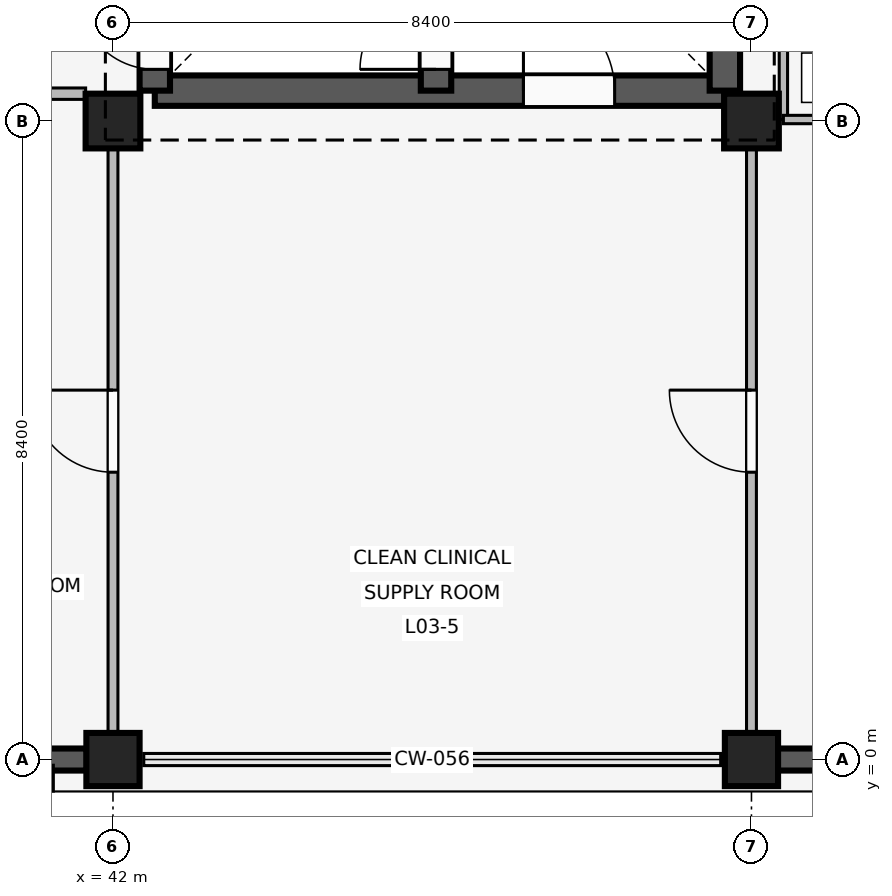
"""IFC4 building model, lengths in metres.
Left out: names, types, materials, properties, quantities, classifications, styles, units other than length and angle.
Written with IfcOpenShell. Run it as: python <this file> out.ifc"""

import sys

from ifc_helpers import new_model, si_unit, direction, frame, frame_2d, origin, origin_2d, place, context, subcontext, project, spatial, rectangle, extrude, element, fill, save


model = new_model("IFC4")
c1 = context("Model", 3, precision=1e-05, world=origin(), true_north=direction((0.0, 1.0)))
c2 = subcontext(c1, "Body", "Model", "MODEL_VIEW")
j1 = project(units=[si_unit("LENGTHUNIT", "METRE"), si_unit("PLANEANGLEUNIT", "RADIAN")], contexts=[c1])
p1 = place(None, origin())
s1 = spatial("IfcSite", under=j1, at=p1, CompositionType="ELEMENT")
p2 = place(p1, origin())
s2 = spatial("IfcBuilding", under=s1, at=p2, CompositionType="ELEMENT")
p3 = place(p2, frame((0.0, 0.0, 12.9)))
s3 = spatial("IfcBuildingStorey", under=s2, at=p3, CompositionType="ELEMENT", Elevation=12.9)
p4 = place(p3, frame((42.0, 0.0, 0.0), z_axis=(0.0, 0.0, 1.0), x_axis=(1.0, 0.0, 0.0)))
e1 = element("IfcColumn", 1, at=p4, inside=s3, PredefinedType="COLUMN", context=c2, shape_type="SweptSolid", body=[
    extrude(rectangle(XDim=0.7, YDim=0.7, at=origin_2d()), origin(), (0.0, 0.0, 1.0), 3.3),
])
p5 = place(p3, frame((42.0, 8.4, 0.0), z_axis=(0.0, 0.0, 1.0), x_axis=(1.0, 0.0, 0.0)))
e2 = element("IfcColumn", 2, at=p5, inside=s3, PredefinedType="COLUMN", context=c2, shape_type="SweptSolid", body=[
    extrude(rectangle(XDim=0.72, YDim=0.72, at=origin_2d()), origin(), (0.0, 0.0, 1.0), 3.3),
])
p6 = place(p3, frame((50.4, 0.0, 0.0), z_axis=(0.0, 0.0, 1.0), x_axis=(1.0, 0.0, 0.0)))
e3 = element("IfcColumn", 3, at=p6, inside=s3, PredefinedType="COLUMN", context=c2, shape_type="SweptSolid", body=[
    extrude(rectangle(XDim=0.7, YDim=0.7, at=origin_2d()), origin(), (0.0, 0.0, 1.0), 3.3),
])
p7 = place(p3, frame((50.4, 8.4, 0.0), z_axis=(0.0, 0.0, 1.0), x_axis=(1.0, 0.0, 0.0)))
e4 = element("IfcColumn", 4, at=p7, inside=s3, PredefinedType="COLUMN", context=c2, shape_type="SweptSolid", body=[
    extrude(rectangle(XDim=0.72, YDim=0.72, at=origin_2d()), origin(), (0.0, 0.0, 1.0), 3.3),
])
p8 = place(p3, frame((41.655, 0.0, 0.0), z_axis=(0.0, 0.0, 1.0), x_axis=(-1.0, 0.0, 0.0)))
e5 = element("IfcWall", 5, at=p8, inside=s3, PredefinedType="SOLIDWALL", context=c2, shape_type="SweptSolid", body=[
    extrude(rectangle(XDim=7.71, YDim=0.29, at=frame_2d((3.855, 0.0))), origin(), (0.0, 0.0, 1.0), 2.44),
])
p9 = place(p8, frame((5.127, 0.0, 0.85)))
e6 = element("IfcOpeningElement", 6, at=p9, cuts=e5, PredefinedType="OPENING", context=c2, shape_type="SweptSolid", body=[
    extrude(rectangle(XDim=1.62, YDim=0.95, at=frame_2d((0.81, 0.475))), frame((0.0, 0.155, 0.0), z_axis=(0.0, -1.0, 0.0), x_axis=(1.0, 0.0, 0.0)), (0.0, 0.0, 1.0), 0.31),
])
p10 = place(p3, frame((41.115, -0.075, 0.0), z_axis=(0.0, 0.0, 1.0), x_axis=(0.0, -1.0, 0.0)))
e7 = element("IfcWall", 7, at=p10, inside=s3, PredefinedType="ELEMENTEDWALL", context=c2, shape_type="SweptSolid", body=[
    extrude(rectangle(XDim=0.34, YDim=0.2, at=frame_2d((0.17, 0.0))), origin(), (0.0, 0.0, 1.0), 2.42),
])
p11 = place(p3, frame((58.455, 0.0, 0.0), z_axis=(0.0, 0.0, 1.0), x_axis=(-1.0, 0.0, 0.0)))
e8 = element("IfcWall", 8, at=p11, inside=s3, PredefinedType="SOLIDWALL", context=c2, shape_type="SweptSolid", body=[
    extrude(rectangle(XDim=7.71, YDim=0.29, at=frame_2d((3.855, 0.0))), origin(), (0.0, 0.0, 1.0), 2.44),
])
p12 = place(p11, frame((0.963, 0.0, 0.85)))
e9 = element("IfcOpeningElement", 9, at=p12, cuts=e8, PredefinedType="OPENING", context=c2, shape_type="SweptSolid", body=[
    extrude(rectangle(XDim=1.62, YDim=0.95, at=frame_2d((0.81, 0.475))), frame((0.0, 0.155, 0.0), z_axis=(0.0, -1.0, 0.0), x_axis=(1.0, 0.0, 0.0)), (0.0, 0.0, 1.0), 0.31),
])
p13 = place(p11, frame((5.127, 0.0, 0.85)))
e10 = element("IfcOpeningElement", 10, at=p13, cuts=e8, PredefinedType="OPENING", context=c2, shape_type="SweptSolid", body=[
    extrude(rectangle(XDim=1.62, YDim=0.95, at=frame_2d((0.81, 0.475))), frame((0.0, 0.155, 0.0), z_axis=(0.0, -1.0, 0.0), x_axis=(1.0, 0.0, 0.0)), (0.0, 0.0, 1.0), 0.31),
])
p14 = place(p3, frame((42.55, 8.8, 0.0), z_axis=(0.0, 0.0, 1.0), x_axis=(1.0, 0.0, 0.0)))
e11 = element("IfcWall", 11, at=p14, inside=s3, PredefinedType="SHEAR", context=c2, shape_type="SweptSolid", body=[
    extrude(rectangle(XDim=7.5, YDim=0.4, at=frame_2d((3.75, 0.0))), origin(), (0.0, 0.0, 1.0), 3.02),
])
p15 = place(p14, frame((4.85, 0.0, 0.0)))
e12 = element("IfcOpeningElement", 12, at=p15, cuts=e11, PredefinedType="OPENING", context=c2, shape_type="SweptSolid", body=[
    extrude(rectangle(XDim=1.2, YDim=2.2, at=frame_2d((0.6, 1.1))), frame((0.0, 0.21, 0.0), z_axis=(0.0, -1.0, 0.0), x_axis=(1.0, 0.0, 0.0)), (0.0, 0.0, 1.0), 0.42),
])
p16 = place(p3, frame((42.55, 8.8, 0.0), z_axis=(0.0, 0.0, 1.0), x_axis=(0.0, 1.0, 0.0)))
e13 = element("IfcWall", 13, at=p16, inside=s3, PredefinedType="SHEAR", context=c2, shape_type="SweptSolid", body=[
    extrude(rectangle(XDim=7.55, YDim=0.4, at=frame_2d((3.775, 0.0))), origin(), (0.0, 0.0, 1.0), 3.02),
])
p17 = place(p16, frame((0.28, 0.0, 0.0)))
e14 = element("IfcOpeningElement", 14, at=p17, cuts=e13, PredefinedType="OPENING", context=c2, shape_type="SweptSolid", body=[
    extrude(rectangle(XDim=1.0, YDim=2.15, at=frame_2d((0.5, 1.075))), frame((0.0, 0.21, 0.0), z_axis=(0.0, -1.0, 0.0), x_axis=(1.0, 0.0, 0.0)), (0.0, 0.0, 1.0), 0.42),
])
p18 = place(p3, frame((50.05, 8.8, 0.0), z_axis=(0.0, 0.0, 1.0), x_axis=(0.0, 1.0, 0.0)))
e15 = element("IfcWall", 15, at=p18, inside=s3, PredefinedType="SHEAR", context=c2, shape_type="SweptSolid", body=[
    extrude(rectangle(XDim=7.55, YDim=0.4, at=frame_2d((3.775, 0.0))), origin(), (0.0, 0.0, 1.0), 3.02),
])
p19 = place(p18, frame((2.4, 0.0, 0.0)))
e16 = element("IfcOpeningElement", 16, at=p19, cuts=e15, PredefinedType="OPENING", context=c2, shape_type="SweptSolid", body=[
    extrude(rectangle(XDim=1.2, YDim=2.2, at=frame_2d((0.6, 1.1))), frame((0.0, 0.21, 0.0), z_axis=(0.0, -1.0, 0.0), x_axis=(1.0, 0.0, 0.0)), (0.0, 0.0, 1.0), 0.42),
])
p20 = place(p3, frame((46.25, 8.8, 0.0), z_axis=(0.0, 0.0, 1.0), x_axis=(0.0, 1.0, 0.0)))
e17 = element("IfcWall", 17, at=p20, inside=s3, PredefinedType="SHEAR", context=c2, shape_type="SweptSolid", body=[
    extrude(rectangle(XDim=7.55, YDim=0.4, at=frame_2d((3.775, 0.0))), origin(), (0.0, 0.0, 1.0), 3.02),
])
p21 = place(p20, frame((0.28, 0.0, 0.0)))
e18 = element("IfcOpeningElement", 18, at=p21, cuts=e17, PredefinedType="OPENING", context=c2, shape_type="SweptSolid", body=[
    extrude(rectangle(XDim=1.0, YDim=2.15, at=frame_2d((0.5, 1.075))), frame((0.0, 0.21, 0.0), z_axis=(0.0, -1.0, 0.0), x_axis=(1.0, 0.0, 0.0)), (0.0, 0.0, 1.0), 0.42),
])
p22 = place(p3, frame((39.46, 8.76, 0.0), z_axis=(0.0, 0.0, 1.0), x_axis=(1.0, 0.0, 0.0)))
e19 = element("IfcWall", 19, at=p22, inside=s3, PredefinedType="PARTITIONING", context=c2, shape_type="SweptSolid", body=[
    extrude(rectangle(XDim=2.18, YDim=0.15, at=frame_2d((1.09, 0.0))), origin(), (0.0, 0.0, 1.0), 2.42),
])
p23 = place(p22, frame((0.5, 0.0, 0.0)))
e20 = element("IfcOpeningElement", 20, at=p23, cuts=e19, PredefinedType="OPENING", context=c2, shape_type="SweptSolid", body=[
    extrude(rectangle(XDim=1.08, YDim=2.15, at=frame_2d((0.54, 1.075))), frame((0.0, 0.085, 0.0), z_axis=(0.0, -1.0, 0.0), x_axis=(1.0, 0.0, 0.0)), (0.0, 0.0, 1.0), 0.17),
])
p24 = place(p3, frame((42.0, 0.14, 0.0), z_axis=(0.0, 0.0, 1.0), x_axis=(0.0, 1.0, 0.0)))
e21 = element("IfcWall", 21, at=p24, inside=s3, PredefinedType="PARTITIONING", context=c2, shape_type="SweptSolid", body=[
    extrude(rectangle(XDim=8.21, YDim=0.13, at=frame_2d((4.105, 0.0))), origin(), (0.0, 0.0, 1.0), 2.42),
])
p25 = place(p24, frame((3.64, 0.0, 0.0)))
e22 = element("IfcOpeningElement", 22, at=p25, cuts=e21, PredefinedType="OPENING", context=c2, shape_type="SweptSolid", body=[
    extrude(rectangle(XDim=1.08, YDim=2.15, at=frame_2d((0.54, 1.075))), frame((0.0, 0.075, 0.0), z_axis=(0.0, -1.0, 0.0), x_axis=(1.0, 0.0, 0.0)), (0.0, 0.0, 1.0), 0.15),
])
p26 = place(p3, frame((50.4, 0.14, 0.0), z_axis=(0.0, 0.0, 1.0), x_axis=(0.0, 1.0, 0.0)))
e23 = element("IfcWall", 23, at=p26, inside=s3, PredefinedType="PARTITIONING", context=c2, shape_type="SweptSolid", body=[
    extrude(rectangle(XDim=8.21, YDim=0.13, at=frame_2d((4.105, 0.0))), origin(), (0.0, 0.0, 1.0), 2.42),
])
p27 = place(p26, frame((3.64, 0.0, 0.0)))
e24 = element("IfcOpeningElement", 24, at=p27, cuts=e23, PredefinedType="OPENING", context=c2, shape_type="SweptSolid", body=[
    extrude(rectangle(XDim=1.08, YDim=2.15, at=frame_2d((0.54, 1.075))), frame((0.0, 0.075, 0.0), z_axis=(0.0, -1.0, 0.0), x_axis=(1.0, 0.0, 0.0)), (0.0, 0.0, 1.0), 0.15),
])
p28 = place(p3, frame((50.82, 8.42, 0.0), z_axis=(0.0, 0.0, 1.0), x_axis=(0.0, 1.0, 0.0)))
e25 = element("IfcWall", 25, at=p28, inside=s3, PredefinedType="PARTITIONING", context=c2, shape_type="SweptSolid", body=[
    extrude(rectangle(XDim=2.61, YDim=0.11, at=frame_2d((1.305, 0.0))), origin(), (0.0, 0.0, 1.0), 2.42),
])
p29 = place(p3, frame((50.82, 8.42, 0.0), z_axis=(0.0, 0.0, 1.0), x_axis=(1.0, 0.0, 0.0)))
e26 = element("IfcWall", 26, at=p29, inside=s3, PredefinedType="PARTITIONING", context=c2, shape_type="SweptSolid", body=[
    extrude(rectangle(XDim=1.98, YDim=0.11, at=frame_2d((0.99, 0.0))), origin(), (0.0, 0.0, 1.0), 2.42),
])
p30 = place(p29, frame((0.54, 0.0, 0.0)))
e27 = element("IfcOpeningElement", 27, at=p30, cuts=e26, PredefinedType="OPENING", context=c2, shape_type="SweptSolid", body=[
    extrude(rectangle(XDim=0.9, YDim=2.1, at=frame_2d((0.45, 1.05))), frame((0.0, 0.065, 0.0), z_axis=(0.0, -1.0, 0.0), x_axis=(1.0, 0.0, 0.0)), (0.0, 0.0, 1.0), 0.13),
])
p31 = place(p15, origin())
e28 = element("IfcDoor", 28, at=p31, inside=s3, OperationType="SINGLE_SWING_LEFT", PredefinedType="DOOR", context=c2, shape_type="SweptSolid", body=[
    extrude(rectangle(XDim=1.2, YDim=2.2, at=frame_2d((0.6, 1.1))), frame((0.0, 0.025, 0.0), z_axis=(0.0, -1.0, 0.0), x_axis=(1.0, 0.0, 0.0)), (0.0, 0.0, 1.0), 0.05),
])
fill(e12, e28)
p32 = place(p17, origin())
e29 = element("IfcDoor", 29, at=p32, inside=s3, OperationType="SINGLE_SWING_RIGHT", PredefinedType="DOOR", context=c2, shape_type="SweptSolid", body=[
    extrude(rectangle(XDim=1.0, YDim=2.15, at=frame_2d((0.5, 1.075))), frame((0.0, 0.025, 0.0), z_axis=(0.0, -1.0, 0.0), x_axis=(1.0, 0.0, 0.0)), (0.0, 0.0, 1.0), 0.05),
])
fill(e14, e29)
p33 = place(p21, origin())
e30 = element("IfcDoor", 30, at=p33, inside=s3, OperationType="SINGLE_SWING_LEFT", PredefinedType="DOOR", context=c2, shape_type="SweptSolid", body=[
    extrude(rectangle(XDim=1.0, YDim=2.15, at=frame_2d((0.5, 1.075))), frame((0.0, 0.025, 0.0), z_axis=(0.0, -1.0, 0.0), x_axis=(1.0, 0.0, 0.0)), (0.0, 0.0, 1.0), 0.05),
])
fill(e18, e30)
p34 = place(p25, origin())
e31 = element("IfcDoor", 31, at=p34, inside=s3, OperationType="SINGLE_SWING_RIGHT", PredefinedType="DOOR", context=c2, shape_type="SweptSolid", body=[
    extrude(rectangle(XDim=1.08, YDim=2.15, at=frame_2d((0.54, 1.075))), frame((0.0, 0.025, 0.0), z_axis=(0.0, -1.0, 0.0), x_axis=(1.0, 0.0, 0.0)), (0.0, 0.0, 1.0), 0.05),
])
fill(e22, e31)
p35 = place(p27, origin())
e32 = element("IfcDoor", 32, at=p35, inside=s3, OperationType="SINGLE_SWING_RIGHT", PredefinedType="DOOR", context=c2, shape_type="SweptSolid", body=[
    extrude(rectangle(XDim=1.08, YDim=2.15, at=frame_2d((0.54, 1.075))), frame((0.0, 0.025, 0.0), z_axis=(0.0, -1.0, 0.0), x_axis=(1.0, 0.0, 0.0)), (0.0, 0.0, 1.0), 0.05),
])
fill(e24, e32)
save(model, sys.argv[1])
